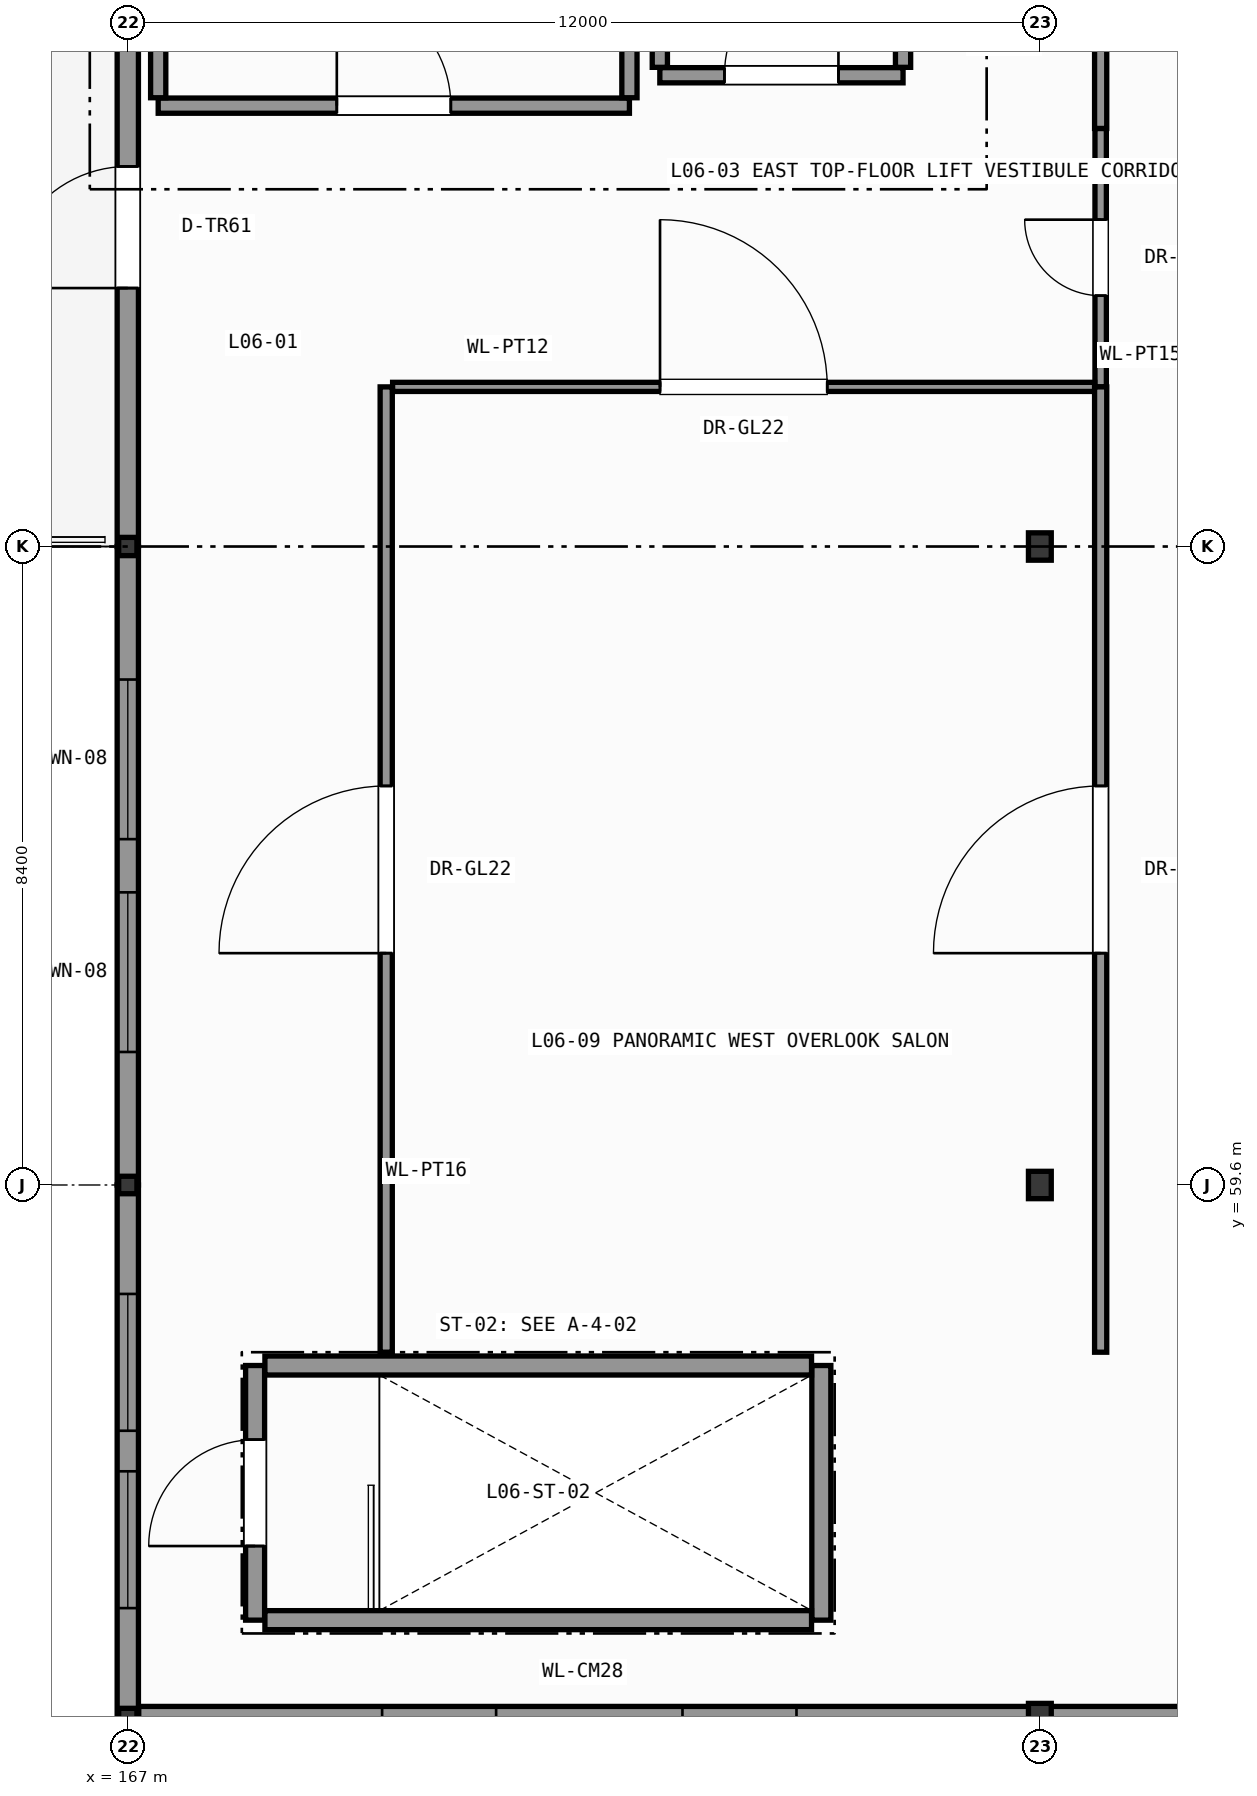
"""IFC4 building model, lengths in metres.
Left out: names, types, materials, properties, quantities, classifications, styles, units other than length and angle.
Written with IfcOpenShell. Run it as: python <this file> out.ifc"""

import sys

from ifc_helpers import new_model, si_unit, direction, frame, frame_2d, origin, origin_2d, place, context, subcontext, project, spatial, rectangle, i_section, extrude, element, fill, save


model = new_model("IFC4")
c1 = context("Model", 3, precision=1e-05, world=origin(), true_north=direction((0.0, 1.0)))
c2 = subcontext(c1, "Body", "Model", "MODEL_VIEW")
j1 = project(units=[si_unit("LENGTHUNIT", "METRE"), si_unit("PLANEANGLEUNIT", "RADIAN")], contexts=[c1])
p1 = place(None, origin())
s1 = spatial("IfcSite", under=j1, at=p1, CompositionType="ELEMENT")
p2 = place(p1, origin())
s2 = spatial("IfcBuilding", under=s1, at=p2, CompositionType="ELEMENT")
p3 = place(p2, frame((0.0, 0.0, 26.4)))
s3 = spatial("IfcBuildingStorey", under=s2, at=p3, CompositionType="ELEMENT", Elevation=26.4)
for number, where, z_axis, x_axis in (
    (1, (167.0, 52.6, 0.0), (0.0, 0.0, 1.0), (1.0, 0.0, 0.0)),
    (2, (167.0, 59.6, 0.0), (0.0, 0.0, 1.0), (1.0, 0.0, 0.0)),
):
    element("IfcColumn", number, at=place(p3, frame(where, z_axis=z_axis, x_axis=x_axis)), inside=s3, PredefinedType="COLUMN", context=c2, shape_type="SweptSolid", body=[
        extrude(i_section(OverallWidth=0.24, OverallDepth=0.23, WebThickness=0.008, FlangeThickness=0.012, FilletRadius=0.021, at=origin_2d()), origin(), (0.0, 0.0, 1.0), 4.2),
    ])
p4 = place(p3, frame((167.0, 68.0, 0.0), z_axis=(0.0, 0.0, 1.0), x_axis=(1.0, 0.0, 0.0)))
e3 = element("IfcColumn", 3, at=p4, inside=s3, PredefinedType="COLUMN", context=c2, shape_type="SweptSolid", body=[
    extrude(i_section(OverallWidth=0.24, OverallDepth=0.24, WebThickness=0.01, FlangeThickness=0.017, FilletRadius=0.021, at=origin_2d()), origin(), (0.0, 0.0, 1.0), 4.2),
])
for number, where, z_axis, x_axis in (
    (4, (179.0, 52.6, 0.0), (0.0, 0.0, 1.0), (1.0, 0.0, 0.0)),
    (5, (179.0, 59.6, 0.0), (0.0, 0.0, 1.0), (1.0, 0.0, 0.0)),
    (6, (179.0, 68.0, 0.0), (0.0, 0.0, 1.0), (1.0, 0.0, 0.0)),
):
    element("IfcColumn", number, at=place(p3, frame(where, z_axis=z_axis, x_axis=x_axis)), inside=s3, PredefinedType="COLUMN", context=c2, shape_type="SweptSolid", body=[
        extrude(i_section(OverallWidth=0.3, OverallDepth=0.36, WebThickness=0.012, FlangeThickness=0.022, FilletRadius=0.027, at=origin_2d()), origin(), (0.0, 0.0, 1.0), 4.2),
    ])
p5 = place(p3, frame((167.0, 68.0, 0.0), z_axis=(0.0, 0.0, 1.0), x_axis=(0.0, 1.0, 0.0)))
e7 = element("IfcWall", 7, at=p5, inside=s3, PredefinedType="SOLIDWALL", context=c2, shape_type="SweptSolid", body=[
    extrude(rectangle(XDim=8.4, YDim=0.28, at=frame_2d((4.2, 0.0))), origin(), (0.0, 0.0, 1.0), 3.545),
])
p6 = place(p5, frame((3.4, 0.0, 0.0)))
e8 = element("IfcOpeningElement", 8, at=p6, cuts=e7, PredefinedType="OPENING", context=c2, shape_type="SweptSolid", body=[
    extrude(rectangle(XDim=1.6, YDim=2.4, at=frame_2d((0.8, 1.2))), frame((0.0, 0.15, 0.0), z_axis=(0.0, -1.0, 0.0), x_axis=(1.0, 0.0, 0.0)), (0.0, 0.0, 1.0), 0.3),
])
p7 = place(p3, frame((167.0, 59.6, 0.0), z_axis=(0.0, 0.0, 1.0), x_axis=(0.0, 1.0, 0.0)))
e9 = element("IfcWall", 9, at=p7, inside=s3, PredefinedType="SOLIDWALL", context=c2, shape_type="SweptSolid", body=[
    extrude(rectangle(XDim=8.4, YDim=0.28, at=frame_2d((4.2, 0.0))), origin(), (0.0, 0.0, 1.0), 3.545),
])
p8 = place(p7, frame((1.75, 0.0, 0.95)))
e10 = element("IfcOpeningElement", 10, at=p8, cuts=e9, PredefinedType="OPENING", context=c2, shape_type="SweptSolid", body=[
    extrude(rectangle(XDim=2.1, YDim=2.2, at=frame_2d((1.05, 1.1))), frame((0.0, 0.15, 0.0), z_axis=(0.0, -1.0, 0.0), x_axis=(1.0, 0.0, 0.0)), (0.0, 0.0, 1.0), 0.3),
])
p9 = place(p7, frame((4.55, 0.0, 0.95)))
e11 = element("IfcOpeningElement", 11, at=p9, cuts=e9, PredefinedType="OPENING", context=c2, shape_type="SweptSolid", body=[
    extrude(rectangle(XDim=2.1, YDim=2.2, at=frame_2d((1.05, 1.1))), frame((0.0, 0.15, 0.0), z_axis=(0.0, -1.0, 0.0), x_axis=(1.0, 0.0, 0.0)), (0.0, 0.0, 1.0), 0.3),
])
p10 = place(p3, frame((167.0, 52.6, 0.0), z_axis=(0.0, 0.0, 1.0), x_axis=(0.0, 1.0, 0.0)))
e12 = element("IfcWall", 12, at=p10, inside=s3, PredefinedType="SOLIDWALL", context=c2, shape_type="SweptSolid", body=[
    extrude(rectangle(XDim=7.0, YDim=0.28, at=frame_2d((3.5, 0.0))), origin(), (0.0, 0.0, 1.0), 3.695),
])
p11 = place(p10, frame((1.433, 0.0, 0.95)))
e13 = element("IfcOpeningElement", 13, at=p11, cuts=e12, PredefinedType="OPENING", context=c2, shape_type="SweptSolid", body=[
    extrude(rectangle(XDim=1.8, YDim=2.35, at=frame_2d((0.9, 1.175))), frame((0.0, 0.15, 0.0), z_axis=(0.0, -1.0, 0.0), x_axis=(1.0, 0.0, 0.0)), (0.0, 0.0, 1.0), 0.3),
])
p12 = place(p10, frame((3.767, 0.0, 0.95)))
e14 = element("IfcOpeningElement", 14, at=p12, cuts=e12, PredefinedType="OPENING", context=c2, shape_type="SweptSolid", body=[
    extrude(rectangle(XDim=1.8, YDim=2.35, at=frame_2d((0.9, 1.175))), frame((0.0, 0.15, 0.0), z_axis=(0.0, -1.0, 0.0), x_axis=(1.0, 0.0, 0.0)), (0.0, 0.0, 1.0), 0.3),
])
p13 = place(p3, frame((179.0, 52.6, 0.0), z_axis=(0.0, 0.0, 1.0), x_axis=(-1.0, 0.0, 0.0)))
e15 = element("IfcWall", 15, at=p13, inside=s3, PredefinedType="SOLIDWALL", context=c2, shape_type="SweptSolid", body=[
    extrude(rectangle(XDim=11.856, YDim=0.28, at=frame_2d((5.928, 0.0))), origin(), (0.0, 0.0, 1.0), 3.435),
])
p14 = place(p13, frame((3.202, 0.0, 0.95)))
e16 = element("IfcOpeningElement", 16, at=p14, cuts=e15, PredefinedType="OPENING", context=c2, shape_type="SweptSolid", body=[
    extrude(rectangle(XDim=1.5, YDim=2.09, at=frame_2d((0.75, 1.045))), frame((0.0, 0.15, 0.0), z_axis=(0.0, -1.0, 0.0), x_axis=(1.0, 0.0, 0.0)), (0.0, 0.0, 1.0), 0.3),
])
p15 = place(p13, frame((7.154, 0.0, 0.95)))
e17 = element("IfcOpeningElement", 17, at=p15, cuts=e15, PredefinedType="OPENING", context=c2, shape_type="SweptSolid", body=[
    extrude(rectangle(XDim=1.5, YDim=2.09, at=frame_2d((0.75, 1.045))), frame((0.0, 0.15, 0.0), z_axis=(0.0, -1.0, 0.0), x_axis=(1.0, 0.0, 0.0)), (0.0, 0.0, 1.0), 0.3),
])
p16 = place(p3, frame((192.11, 52.6, 0.0), z_axis=(0.0, 0.0, 1.0), x_axis=(-1.0, 0.0, 0.0)))
e18 = element("IfcWall", 18, at=p16, inside=s3, PredefinedType="SOLIDWALL", context=c2, shape_type="SweptSolid", body=[
    extrude(rectangle(XDim=13.11, YDim=0.28, at=frame_2d((6.555, 0.0))), origin(), (0.0, 0.0, 1.0), 3.435),
])
p17 = place(p16, frame((3.32, 0.0, 0.95)))
e19 = element("IfcOpeningElement", 19, at=p17, cuts=e18, PredefinedType="OPENING", context=c2, shape_type="SweptSolid", body=[
    extrude(rectangle(XDim=2.1, YDim=2.09, at=frame_2d((1.05, 1.045))), frame((0.0, 0.15, 0.0), z_axis=(0.0, -1.0, 0.0), x_axis=(1.0, 0.0, 0.0)), (0.0, 0.0, 1.0), 0.3),
])
p18 = place(p16, frame((7.69, 0.0, 0.95)))
e20 = element("IfcOpeningElement", 20, at=p18, cuts=e18, PredefinedType="OPENING", context=c2, shape_type="SweptSolid", body=[
    extrude(rectangle(XDim=2.1, YDim=2.09, at=frame_2d((1.05, 1.045))), frame((0.0, 0.15, 0.0), z_axis=(0.0, -1.0, 0.0), x_axis=(1.0, 0.0, 0.0)), (0.0, 0.0, 1.0), 0.3),
])
p19 = place(p3, frame((168.675, 53.875, 0.0), z_axis=(0.0, 0.0, 1.0), x_axis=(0.0, 1.0, 0.0)))
e21 = element("IfcWall", 21, at=p19, inside=s3, PredefinedType="SHEAR", context=c2, shape_type="SweptSolid", body=[
    extrude(rectangle(XDim=3.35, YDim=0.25, at=frame_2d((1.675, 0.0))), origin(), (0.0, 0.0, 1.0), 4.0),
])
p20 = place(p19, frame((0.975, 0.0, 0.0)))
e22 = element("IfcOpeningElement", 22, at=p20, cuts=e21, PredefinedType="OPENING", context=c2, shape_type="SweptSolid", body=[
    extrude(rectangle(XDim=1.4, YDim=2.2, at=frame_2d((0.7, 1.1))), frame((0.0, 0.135, 0.0), z_axis=(0.0, -1.0, 0.0), x_axis=(1.0, 0.0, 0.0)), (0.0, 0.0, 1.0), 0.27),
])
p21 = place(p3, frame((176.125, 53.875, 0.0), z_axis=(0.0, 0.0, 1.0), x_axis=(0.0, 1.0, 0.0)))
e23 = element("IfcWall", 23, at=p21, inside=s3, PredefinedType="SHEAR", context=c2, shape_type="SweptSolid", body=[
    extrude(rectangle(XDim=3.35, YDim=0.25, at=frame_2d((1.675, 0.0))), origin(), (0.0, 0.0, 1.0), 4.0),
])
for number, where, z_axis, x_axis in (
    (24, (168.804, 53.875, 0.0), (0.0, 0.0, 1.0), (1.0, 0.0, 0.0)),
    (25, (168.804, 57.225, 0.0), (0.0, 0.0, 1.0), (1.0, 0.0, 0.0)),
):
    element("IfcWall", number, at=place(p3, frame(where, z_axis=z_axis, x_axis=x_axis)), inside=s3, PredefinedType="SHEAR", context=c2, shape_type="SweptSolid", body=[
        extrude(rectangle(XDim=7.192, YDim=0.25, at=frame_2d((3.596, 0.0))), origin(), (0.0, 0.0, 1.0), 4.0),
    ])
p22 = place(p3, frame((167.4, 73.8, 0.0), z_axis=(0.0, 0.0, 1.0), x_axis=(1.0, 0.0, 0.0)))
e26 = element("IfcWall", 26, at=p22, inside=s3, PredefinedType="PARTITIONING", context=c2, shape_type="SweptSolid", body=[
    extrude(rectangle(XDim=6.2, YDim=0.2, at=frame_2d((3.1, 0.0))), origin(), (0.0, 0.0, 1.0), 3.625),
])
p23 = place(p22, frame((2.35, 0.0, 0.0)))
e27 = element("IfcOpeningElement", 27, at=p23, cuts=e26, PredefinedType="OPENING", context=c2, shape_type="SweptSolid", body=[
    extrude(rectangle(XDim=1.5, YDim=2.2, at=frame_2d((0.75, 1.1))), frame((0.0, 0.11, 0.0), z_axis=(0.0, -1.0, 0.0), x_axis=(1.0, 0.0, 0.0)), (0.0, 0.0, 1.0), 0.22),
])
for number, where, z_axis, x_axis in (
    (28, (167.4, 73.904, 0.0), (0.0, 0.0, 1.0), (0.0, 1.0, 0.0)),
    (29, (173.6, 73.904, 0.0), (0.0, 0.0, 1.0), (0.0, 1.0, 0.0)),
):
    element("IfcWall", number, at=place(p3, frame(where, z_axis=z_axis, x_axis=x_axis)), inside=s3, PredefinedType="PARTITIONING", context=c2, shape_type="SweptSolid", body=[
        extrude(rectangle(XDim=4.296, YDim=0.2, at=frame_2d((2.148, 0.0))), origin(), (0.0, 0.0, 1.0), 4.0),
    ])
p24 = place(p3, frame((174.0, 74.2, 0.0), z_axis=(0.0, 0.0, 1.0), x_axis=(1.0, 0.0, 0.0)))
e30 = element("IfcWall", 30, at=p24, inside=s3, PredefinedType="PARTITIONING", context=c2, shape_type="SweptSolid", body=[
    extrude(rectangle(XDim=3.2, YDim=0.2, at=frame_2d((1.6, 0.0))), origin(), (0.0, 0.0, 1.0), 4.0),
])
p25 = place(p24, frame((0.85, 0.0, 0.0)))
e31 = element("IfcOpeningElement", 31, at=p25, cuts=e30, PredefinedType="OPENING", context=c2, shape_type="SweptSolid", body=[
    extrude(rectangle(XDim=1.5, YDim=2.2, at=frame_2d((0.75, 1.1))), frame((0.0, 0.11, 0.0), z_axis=(0.0, -1.0, 0.0), x_axis=(1.0, 0.0, 0.0)), (0.0, 0.0, 1.0), 0.22),
])
for number, where, z_axis, x_axis in (
    (32, (174.0, 74.304, 0.0), (0.0, 0.0, 1.0), (0.0, 1.0, 0.0)),
    (33, (177.2, 74.304, 0.0), (0.0, 0.0, 1.0), (0.0, 1.0, 0.0)),
):
    element("IfcWall", number, at=place(p3, frame(where, z_axis=z_axis, x_axis=x_axis)), inside=s3, PredefinedType="PARTITIONING", context=c2, shape_type="SweptSolid", body=[
        extrude(rectangle(XDim=3.896, YDim=0.2, at=frame_2d((1.948, 0.0))), origin(), (0.0, 0.0, 1.0), 4.0),
    ])
p26 = place(p3, frame((170.4, 57.4, 0.0), z_axis=(0.0, 0.0, 1.0), x_axis=(0.0, 1.0, 0.0)))
e34 = element("IfcWall", 34, at=p26, inside=s3, PredefinedType="PARTITIONING", context=c2, shape_type="SweptSolid", body=[
    extrude(rectangle(XDim=12.7, YDim=0.16, at=frame_2d((6.35, 0.0))), origin(), (0.0, 0.0, 1.0), 4.0),
])
p27 = place(p26, frame((5.25, 0.0, 0.0)))
e35 = element("IfcOpeningElement", 35, at=p27, cuts=e34, PredefinedType="OPENING", context=c2, shape_type="SweptSolid", body=[
    extrude(rectangle(XDim=2.2, YDim=2.6, at=frame_2d((1.1, 1.3))), frame((0.0, 0.09, 0.0), z_axis=(0.0, -1.0, 0.0), x_axis=(1.0, 0.0, 0.0)), (0.0, 0.0, 1.0), 0.18),
])
p28 = place(p3, frame((179.8, 70.1, 0.0), z_axis=(0.0, 0.0, 1.0), x_axis=(0.0, 1.0, 0.0)))
e36 = element("IfcWall", 36, at=p28, inside=s3, PredefinedType="PARTITIONING", context=c2, shape_type="SweptSolid", body=[
    extrude(rectangle(XDim=3.4, YDim=0.15, at=frame_2d((1.7, 0.0))), origin(), (0.0, 0.0, 1.0), 4.0),
])
p29 = place(p28, frame((1.2, 0.0, 0.0)))
e37 = element("IfcOpeningElement", 37, at=p29, cuts=e36, PredefinedType="OPENING", context=c2, shape_type="SweptSolid", body=[
    extrude(rectangle(XDim=1.0, YDim=2.15, at=frame_2d((0.5, 1.075))), frame((0.0, 0.085, 0.0), z_axis=(0.0, -1.0, 0.0), x_axis=(1.0, 0.0, 0.0)), (0.0, 0.0, 1.0), 0.17),
])
p30 = place(p3, frame((170.484, 70.1, 0.0), z_axis=(0.0, 0.0, 1.0), x_axis=(1.0, 0.0, 0.0)))
e38 = element("IfcWall", 38, at=p30, inside=s3, PredefinedType="PARTITIONING", context=c2, shape_type="SweptSolid", body=[
    extrude(rectangle(XDim=9.237, YDim=0.12, at=frame_2d((4.619, 0.0))), origin(), (0.0, 0.0, 1.0), 4.0),
])
p31 = place(p30, frame((3.519, 0.0, 0.0)))
e39 = element("IfcOpeningElement", 39, at=p31, cuts=e38, PredefinedType="OPENING", context=c2, shape_type="SweptSolid", body=[
    extrude(rectangle(XDim=2.2, YDim=2.6, at=frame_2d((1.1, 1.3))), frame((0.0, 0.07, 0.0), z_axis=(0.0, -1.0, 0.0), x_axis=(1.0, 0.0, 0.0)), (0.0, 0.0, 1.0), 0.14),
])
p32 = place(p3, frame((179.8, 73.5, 0.0), z_axis=(0.0, 0.0, 1.0), x_axis=(0.0, 1.0, 0.0)))
e40 = element("IfcWall", 40, at=p32, inside=s3, PredefinedType="PARTITIONING", context=c2, shape_type="SweptSolid", body=[
    extrude(rectangle(XDim=8.3, YDim=0.16, at=frame_2d((4.15, 0.0))), origin(), (0.0, 0.0, 1.0), 4.0),
])
p33 = place(p32, frame((4.31, 0.0, 0.0)))
e41 = element("IfcOpeningElement", 41, at=p33, cuts=e40, PredefinedType="OPENING", context=c2, shape_type="SweptSolid", body=[
    extrude(rectangle(XDim=2.2, YDim=2.6, at=frame_2d((1.1, 1.3))), frame((0.0, 0.09, 0.0), z_axis=(0.0, -1.0, 0.0), x_axis=(1.0, 0.0, 0.0)), (0.0, 0.0, 1.0), 0.18),
])
p34 = place(p3, frame((179.8, 57.4, 0.0), z_axis=(0.0, 0.0, 1.0), x_axis=(0.0, 1.0, 0.0)))
e42 = element("IfcWall", 42, at=p34, inside=s3, PredefinedType="PARTITIONING", context=c2, shape_type="SweptSolid", body=[
    extrude(rectangle(XDim=12.7, YDim=0.16, at=frame_2d((6.35, 0.0))), origin(), (0.0, 0.0, 1.0), 4.0),
])
p35 = place(p34, frame((5.25, 0.0, 0.0)))
e43 = element("IfcOpeningElement", 43, at=p35, cuts=e42, PredefinedType="OPENING", context=c2, shape_type="SweptSolid", body=[
    extrude(rectangle(XDim=2.2, YDim=2.6, at=frame_2d((1.1, 1.3))), frame((0.0, 0.09, 0.0), z_axis=(0.0, -1.0, 0.0), x_axis=(1.0, 0.0, 0.0)), (0.0, 0.0, 1.0), 0.18),
])
p36 = place(p6, origin())
e44 = element("IfcDoor", 44, at=p36, inside=s3, OperationType="SINGLE_SWING_LEFT", PredefinedType="DOOR", context=c2, shape_type="SweptSolid", body=[
    extrude(rectangle(XDim=1.6, YDim=2.4, at=frame_2d((0.8, 1.2))), frame((0.0, 0.025, 0.0), z_axis=(0.0, -1.0, 0.0), x_axis=(1.0, 0.0, 0.0)), (0.0, 0.0, 1.0), 0.05),
])
fill(e8, e44)
p37 = place(p8, origin())
e45 = element("IfcWindow", 45, at=p37, inside=s3, PartitioningType="SINGLE_PANEL", PredefinedType="WINDOW", context=c2, shape_type="SweptSolid", body=[
    extrude(rectangle(XDim=2.1, YDim=2.2, at=frame_2d((1.05, 1.1))), frame((0.0, 0.03, 0.0), z_axis=(0.0, -1.0, 0.0), x_axis=(1.0, 0.0, 0.0)), (0.0, 0.0, 1.0), 0.06),
])
fill(e10, e45)
p38 = place(p9, origin())
e46 = element("IfcWindow", 46, at=p38, inside=s3, PartitioningType="SINGLE_PANEL", PredefinedType="WINDOW", context=c2, shape_type="SweptSolid", body=[
    extrude(rectangle(XDim=2.1, YDim=2.2, at=frame_2d((1.05, 1.1))), frame((0.0, 0.03, 0.0), z_axis=(0.0, -1.0, 0.0), x_axis=(1.0, 0.0, 0.0)), (0.0, 0.0, 1.0), 0.06),
])
fill(e11, e46)
p39 = place(p11, origin())
e47 = element("IfcWindow", 47, at=p39, inside=s3, PartitioningType="SINGLE_PANEL", PredefinedType="WINDOW", context=c2, shape_type="SweptSolid", body=[
    extrude(rectangle(XDim=1.8, YDim=2.35, at=frame_2d((0.9, 1.175))), frame((0.0, 0.03, 0.0), z_axis=(0.0, -1.0, 0.0), x_axis=(1.0, 0.0, 0.0)), (0.0, 0.0, 1.0), 0.06),
])
fill(e13, e47)
p40 = place(p12, origin())
e48 = element("IfcWindow", 48, at=p40, inside=s3, PartitioningType="SINGLE_PANEL", PredefinedType="WINDOW", context=c2, shape_type="SweptSolid", body=[
    extrude(rectangle(XDim=1.8, YDim=2.35, at=frame_2d((0.9, 1.175))), frame((0.0, 0.03, 0.0), z_axis=(0.0, -1.0, 0.0), x_axis=(1.0, 0.0, 0.0)), (0.0, 0.0, 1.0), 0.06),
])
fill(e14, e48)
p41 = place(p14, origin())
e49 = element("IfcWindow", 49, at=p41, inside=s3, PartitioningType="SINGLE_PANEL", PredefinedType="WINDOW", context=c2, shape_type="SweptSolid", body=[
    extrude(rectangle(XDim=1.5, YDim=2.09, at=frame_2d((0.75, 1.045))), frame((0.0, 0.03, 0.0), z_axis=(0.0, -1.0, 0.0), x_axis=(1.0, 0.0, 0.0)), (0.0, 0.0, 1.0), 0.06),
])
fill(e16, e49)
p42 = place(p15, origin())
e50 = element("IfcWindow", 50, at=p42, inside=s3, PartitioningType="SINGLE_PANEL", PredefinedType="WINDOW", context=c2, shape_type="SweptSolid", body=[
    extrude(rectangle(XDim=1.5, YDim=2.09, at=frame_2d((0.75, 1.045))), frame((0.0, 0.03, 0.0), z_axis=(0.0, -1.0, 0.0), x_axis=(1.0, 0.0, 0.0)), (0.0, 0.0, 1.0), 0.06),
])
fill(e17, e50)
p43 = place(p20, origin())
e51 = element("IfcDoor", 51, at=p43, inside=s3, OperationType="SINGLE_SWING_LEFT", PredefinedType="DOOR", context=c2, shape_type="SweptSolid", body=[
    extrude(rectangle(XDim=1.4, YDim=2.2, at=frame_2d((0.7, 1.1))), frame((0.0, 0.025, 0.0), z_axis=(0.0, -1.0, 0.0), x_axis=(1.0, 0.0, 0.0)), (0.0, 0.0, 1.0), 0.05),
])
fill(e22, e51)
p44 = place(p23, origin())
e52 = element("IfcDoor", 52, at=p44, inside=s3, OperationType="SINGLE_SWING_LEFT", PredefinedType="DOOR", context=c2, shape_type="SweptSolid", body=[
    extrude(rectangle(XDim=1.5, YDim=2.2, at=frame_2d((0.75, 1.1))), frame((0.0, 0.025, 0.0), z_axis=(0.0, -1.0, 0.0), x_axis=(1.0, 0.0, 0.0)), (0.0, 0.0, 1.0), 0.05),
])
fill(e27, e52)
p45 = place(p25, origin())
e53 = element("IfcDoor", 53, at=p45, inside=s3, OperationType="SINGLE_SWING_RIGHT", PredefinedType="DOOR", context=c2, shape_type="SweptSolid", body=[
    extrude(rectangle(XDim=1.5, YDim=2.2, at=frame_2d((0.75, 1.1))), frame((0.0, 0.025, 0.0), z_axis=(0.0, -1.0, 0.0), x_axis=(1.0, 0.0, 0.0)), (0.0, 0.0, 1.0), 0.05),
])
fill(e31, e53)
p46 = place(p27, origin())
e54 = element("IfcDoor", 54, at=p46, inside=s3, OperationType="SINGLE_SWING_LEFT", PredefinedType="DOOR", context=c2, shape_type="SweptSolid", body=[
    extrude(rectangle(XDim=2.2, YDim=2.6, at=frame_2d((1.1, 1.3))), frame((0.0, 0.025, 0.0), z_axis=(0.0, -1.0, 0.0), x_axis=(1.0, 0.0, 0.0)), (0.0, 0.0, 1.0), 0.05),
])
fill(e35, e54)
p47 = place(p29, origin())
e55 = element("IfcDoor", 55, at=p47, inside=s3, OperationType="SINGLE_SWING_RIGHT", PredefinedType="DOOR", context=c2, shape_type="SweptSolid", body=[
    extrude(rectangle(XDim=1.0, YDim=2.15, at=frame_2d((0.5, 1.075))), frame((0.0, 0.025, 0.0), z_axis=(0.0, -1.0, 0.0), x_axis=(1.0, 0.0, 0.0)), (0.0, 0.0, 1.0), 0.05),
])
fill(e37, e55)
p48 = place(p31, origin())
e56 = element("IfcDoor", 56, at=p48, inside=s3, OperationType="SINGLE_SWING_LEFT", PredefinedType="DOOR", context=c2, shape_type="SweptSolid", body=[
    extrude(rectangle(XDim=2.2, YDim=2.6, at=frame_2d((1.1, 1.3))), frame((0.0, 0.025, 0.0), z_axis=(0.0, -1.0, 0.0), x_axis=(1.0, 0.0, 0.0)), (0.0, 0.0, 1.0), 0.05),
])
fill(e39, e56)
p49 = place(p35, origin())
e57 = element("IfcDoor", 57, at=p49, inside=s3, OperationType="SINGLE_SWING_LEFT", PredefinedType="DOOR", context=c2, shape_type="SweptSolid", body=[
    extrude(rectangle(XDim=2.2, YDim=2.6, at=frame_2d((1.1, 1.3))), frame((0.0, 0.025, 0.0), z_axis=(0.0, -1.0, 0.0), x_axis=(1.0, 0.0, 0.0)), (0.0, 0.0, 1.0), 0.05),
])
fill(e43, e57)
save(model, sys.argv[1])
